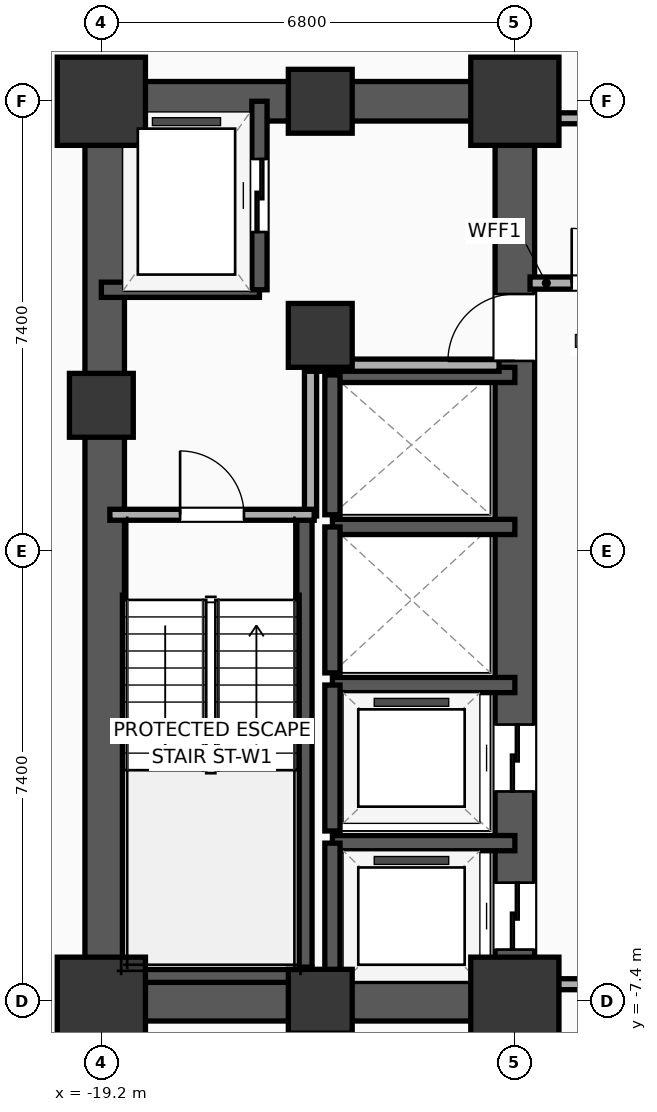
"""IFC4 building model, lengths in metres.
Left out: names, types, materials, properties, quantities, classifications, styles, units other than length and angle.
Written with IfcOpenShell. Run it as: python <this file> out.ifc"""

import sys

from ifc_helpers import new_model, si_unit, direction, frame, frame_2d, origin, origin_2d, place, context, subcontext, project, spatial, rectangle, extrude, element, fill, save


model = new_model("IFC4")
c1 = context("Model", 3, precision=1e-05, world=origin(), true_north=direction((0.0, 1.0)))
c2 = subcontext(c1, "Body", "Model", "MODEL_VIEW")
j1 = project(units=[si_unit("LENGTHUNIT", "METRE"), si_unit("PLANEANGLEUNIT", "RADIAN")], contexts=[c1])
p1 = place(None, origin())
s1 = spatial("IfcSite", under=j1, at=p1, CompositionType="ELEMENT")
p2 = place(p1, origin())
s2 = spatial("IfcBuilding", under=s1, at=p2, CompositionType="ELEMENT")
p3 = place(p2, frame((0.0, 0.0, 68.9)))
s3 = spatial("IfcBuildingStorey", under=s2, at=p3, CompositionType="ELEMENT", Elevation=68.9)
p4 = place(p3, frame((-19.2, -7.4, 0.0), z_axis=(0.0, 0.0, 1.0), x_axis=(1.0, 0.0, 0.0)))
e1 = element("IfcColumn", 1, at=p4, inside=s3, PredefinedType="COLUMN", context=c2, shape_type="SweptSolid", body=[
    extrude(rectangle(XDim=1.45, YDim=1.45, at=origin_2d()), origin(), (0.0, 0.0, 1.0), 3.9),
])
p5 = place(p3, frame((-19.2, 2.4, 0.0), z_axis=(0.0, 0.0, 1.0), x_axis=(1.0, 0.0, 0.0)))
e2 = element("IfcColumn", 2, at=p5, inside=s3, PredefinedType="COLUMN", context=c2, shape_type="SweptSolid", body=[
    extrude(rectangle(XDim=1.05, YDim=1.05, at=origin_2d()), origin(), (0.0, 0.0, 1.0), 3.9),
])
p6 = place(p3, frame((-19.2, 7.4, 0.0), z_axis=(0.0, 0.0, 1.0), x_axis=(1.0, 0.0, 0.0)))
e3 = element("IfcColumn", 3, at=p6, inside=s3, PredefinedType="COLUMN", context=c2, shape_type="SweptSolid", body=[
    extrude(rectangle(XDim=1.45, YDim=1.45, at=origin_2d()), origin(), (0.0, 0.0, 1.0), 3.9),
])
for number, where, z_axis, x_axis in (
    (4, (-15.6, -7.4, 0.0), (0.0, 0.0, 1.0), (1.0, 0.0, 0.0)),
    (5, (-15.6, 7.4, 0.0), (0.0, 0.0, 1.0), (1.0, 0.0, 0.0)),
):
    element("IfcColumn", number, at=place(p3, frame(where, z_axis=z_axis, x_axis=x_axis)), inside=s3, PredefinedType="COLUMN", context=c2, shape_type="SweptSolid", body=[
        extrude(rectangle(XDim=1.05, YDim=1.05, at=origin_2d()), origin(), (0.0, 0.0, 1.0), 3.9),
    ])
p7 = place(p3, frame((-12.4, -7.4, 0.0), z_axis=(0.0, 0.0, 1.0), x_axis=(1.0, 0.0, 0.0)))
e6 = element("IfcColumn", 6, at=p7, inside=s3, PredefinedType="COLUMN", context=c2, shape_type="SweptSolid", body=[
    extrude(rectangle(XDim=1.45, YDim=1.45, at=origin_2d()), origin(), (0.0, 0.0, 1.0), 3.9),
])
p8 = place(p3, frame((-15.6, 3.55, 0.0), z_axis=(0.0, 0.0, 1.0), x_axis=(1.0, 0.0, 0.0)))
e7 = element("IfcColumn", 7, at=p8, inside=s3, PredefinedType="COLUMN", context=c2, shape_type="SweptSolid", body=[
    extrude(rectangle(XDim=1.05, YDim=1.05, at=origin_2d()), origin(), (0.0, 0.0, 1.0), 3.9),
])
p9 = place(p3, frame((-12.4, 7.4, 0.0), z_axis=(0.0, 0.0, 1.0), x_axis=(1.0, 0.0, 0.0)))
e8 = element("IfcColumn", 8, at=p9, inside=s3, PredefinedType="COLUMN", context=c2, shape_type="SweptSolid", body=[
    extrude(rectangle(XDim=1.45, YDim=1.45, at=origin_2d()), origin(), (0.0, 0.0, 1.0), 3.9),
])
for number, where, z_axis, x_axis in (
    (9, (-19.525, -7.4, 0.0), (0.0, 0.0, 1.0), (1.0, 0.0, 0.0)),
    (10, (-19.525, 7.4, 0.0), (0.0, 0.0, 1.0), (1.0, 0.0, 0.0)),
):
    element("IfcWall", number, at=place(p3, frame(where, z_axis=z_axis, x_axis=x_axis)), inside=s3, PredefinedType="SHEAR", context=c2, shape_type="SweptSolid", body=[
        extrude(rectangle(XDim=7.45, YDim=0.65, at=frame_2d((3.725, 0.0))), origin(), (0.0, 0.0, 1.0), 3.65),
    ])
p10 = place(p3, frame((-19.145, -7.4, 0.0), z_axis=(0.0, 0.0, 1.0), x_axis=(0.0, 1.0, 0.0)))
e11 = element("IfcWall", 11, at=p10, inside=s3, PredefinedType="SHEAR", context=c2, shape_type="SweptSolid", body=[
    extrude(rectangle(XDim=14.8, YDim=0.65, at=frame_2d((7.4, 0.0))), origin(), (0.0, 0.0, 1.0), 3.65),
])
p11 = place(p3, frame((-12.4, -7.4, 0.0), z_axis=(0.0, 0.0, 1.0), x_axis=(0.0, 1.0, 0.0)))
e12 = element("IfcWall", 12, at=p11, inside=s3, PredefinedType="SHEAR", context=c2, shape_type="SweptSolid", body=[
    extrude(rectangle(XDim=14.8, YDim=0.65, at=frame_2d((7.4, 0.0))), origin(), (0.0, 0.0, 1.0), 3.65),
])
p12 = place(p11, frame((0.85, 0.0, 0.0)))
e13 = element("IfcOpeningElement", 13, at=p12, cuts=e12, PredefinedType="OPENING", context=c2, shape_type="SweptSolid", body=[
    extrude(rectangle(XDim=1.1, YDim=2.05, at=frame_2d((0.55, 1.025))), frame((0.0, 0.335, 0.0), z_axis=(0.0, -1.0, 0.0), x_axis=(1.0, 0.0, 0.0)), (0.0, 0.0, 1.0), 0.67),
])
p13 = place(p11, frame((3.45, 0.0, 0.0)))
e14 = element("IfcOpeningElement", 14, at=p13, cuts=e12, PredefinedType="OPENING", context=c2, shape_type="SweptSolid", body=[
    extrude(rectangle(XDim=1.1, YDim=2.05, at=frame_2d((0.55, 1.025))), frame((0.0, 0.335, 0.0), z_axis=(0.0, -1.0, 0.0), x_axis=(1.0, 0.0, 0.0)), (0.0, 0.0, 1.0), 0.67),
])
p14 = place(p11, frame((10.53, 0.0, 0.0)))
e15 = element("IfcOpeningElement", 15, at=p14, cuts=e12, PredefinedType="OPENING", context=c2, shape_type="SweptSolid", body=[
    extrude(rectangle(XDim=1.1, YDim=2.05, at=frame_2d((0.55, 1.025))), frame((0.0, 0.335, 0.0), z_axis=(0.0, -1.0, 0.0), x_axis=(1.0, 0.0, 0.0)), (0.0, 0.0, 1.0), 0.67),
])
p15 = place(p3, frame((-15.86, -7.085, 0.0), z_axis=(0.0, 0.0, 1.0), x_axis=(0.0, 1.0, 0.0)))
e16 = element("IfcWall", 16, at=p15, inside=s3, PredefinedType="SOLIDWALL", context=c2, shape_type="SweptSolid", body=[
    extrude(rectangle(XDim=7.685, YDim=0.25, at=frame_2d((3.843, 0.0))), origin(), (0.0, 0.0, 1.0), 3.65),
])
p16 = place(p3, frame((-19.2, -6.965, 0.0), z_axis=(0.0, 0.0, 1.0), x_axis=(1.0, 0.0, 0.0)))
e17 = element("IfcWall", 17, at=p16, inside=s3, PredefinedType="SOLIDWALL", context=c2, shape_type="SweptSolid", body=[
    extrude(rectangle(XDim=3.46, YDim=0.25, at=frame_2d((1.73, 0.0))), origin(), (0.0, 0.0, 1.0), 3.65),
])
p17 = place(p3, frame((-19.2, 4.3, 0.0), z_axis=(0.0, 0.0, 1.0), x_axis=(1.0, 0.0, 0.0)))
e18 = element("IfcWall", 18, at=p17, inside=s3, PredefinedType="SOLIDWALL", context=c2, shape_type="SweptSolid", body=[
    extrude(rectangle(XDim=2.6, YDim=0.25, at=frame_2d((1.3, 0.0))), origin(), (0.0, 0.0, 1.0), 3.65),
])
p18 = place(p3, frame((-16.6, 4.3, 0.0), z_axis=(0.0, 0.0, 1.0), x_axis=(0.0, 1.0, 0.0)))
e19 = element("IfcWall", 19, at=p18, inside=s3, PredefinedType="SOLIDWALL", context=c2, shape_type="SweptSolid", body=[
    extrude(rectangle(XDim=3.1, YDim=0.25, at=frame_2d((1.55, 0.0))), origin(), (0.0, 0.0, 1.0), 3.65),
])
p19 = place(p18, frame((0.95, 0.0, 0.0)))
e20 = element("IfcOpeningElement", 20, at=p19, cuts=e19, PredefinedType="OPENING", context=c2, shape_type="SweptSolid", body=[
    extrude(rectangle(XDim=1.2, YDim=2.05, at=frame_2d((0.6, 1.025))), frame((0.0, 0.135, 0.0), z_axis=(0.0, -1.0, 0.0), x_axis=(1.0, 0.0, 0.0)), (0.0, 0.0, 1.0), 0.27),
])
p20 = place(p3, frame((-12.4, -4.8, 0.0), z_axis=(0.0, 0.0, 1.0), x_axis=(-1.0, 0.0, 0.0)))
e21 = element("IfcWall", 21, at=p20, inside=s3, PredefinedType="SOLIDWALL", context=c2, shape_type="SweptSolid", body=[
    extrude(rectangle(XDim=3.0, YDim=0.25, at=frame_2d((1.5, 0.0))), origin(), (0.0, 0.0, 1.0), 3.65),
])
p21 = place(p3, frame((-15.4, -4.8, 0.0), z_axis=(0.0, 0.0, 1.0), x_axis=(0.0, -1.0, 0.0)))
e22 = element("IfcWall", 22, at=p21, inside=s3, PredefinedType="SOLIDWALL", context=c2, shape_type="SweptSolid", body=[
    extrude(rectangle(XDim=2.6, YDim=0.25, at=frame_2d((1.3, 0.0))), origin(), (0.0, 0.0, 1.0), 3.65),
])
p22 = place(p3, frame((-12.4, -2.2, 0.0), z_axis=(0.0, 0.0, 1.0), x_axis=(-1.0, 0.0, 0.0)))
e23 = element("IfcWall", 23, at=p22, inside=s3, PredefinedType="SOLIDWALL", context=c2, shape_type="SweptSolid", body=[
    extrude(rectangle(XDim=3.0, YDim=0.25, at=frame_2d((1.5, 0.0))), origin(), (0.0, 0.0, 1.0), 3.65),
])
p23 = place(p3, frame((-15.4, -2.2, 0.0), z_axis=(0.0, 0.0, 1.0), x_axis=(0.0, -1.0, 0.0)))
e24 = element("IfcWall", 24, at=p23, inside=s3, PredefinedType="SOLIDWALL", context=c2, shape_type="SweptSolid", body=[
    extrude(rectangle(XDim=2.4, YDim=0.25, at=frame_2d((1.2, 0.0))), origin(), (0.0, 0.0, 1.0), 3.65),
])
p24 = place(p3, frame((-12.4, 0.4, 0.0), z_axis=(0.0, 0.0, 1.0), x_axis=(-1.0, 0.0, 0.0)))
e25 = element("IfcWall", 25, at=p24, inside=s3, PredefinedType="SOLIDWALL", context=c2, shape_type="SweptSolid", body=[
    extrude(rectangle(XDim=3.0, YDim=0.25, at=frame_2d((1.5, 0.0))), origin(), (0.0, 0.0, 1.0), 3.65),
])
p25 = place(p3, frame((-15.4, 0.4, 0.0), z_axis=(0.0, 0.0, 1.0), x_axis=(0.0, -1.0, 0.0)))
e26 = element("IfcWall", 26, at=p25, inside=s3, PredefinedType="SOLIDWALL", context=c2, shape_type="SweptSolid", body=[
    extrude(rectangle(XDim=2.4, YDim=0.25, at=frame_2d((1.2, 0.0))), origin(), (0.0, 0.0, 1.0), 3.65),
])
p26 = place(p3, frame((-12.4, 2.9, 0.0), z_axis=(0.0, 0.0, 1.0), x_axis=(-1.0, 0.0, 0.0)))
e27 = element("IfcWall", 27, at=p26, inside=s3, PredefinedType="SOLIDWALL", context=c2, shape_type="SweptSolid", body=[
    extrude(rectangle(XDim=3.0, YDim=0.25, at=frame_2d((1.5, 0.0))), origin(), (0.0, 0.0, 1.0), 3.65),
])
p27 = place(p3, frame((-15.4, 2.9, 0.0), z_axis=(0.0, 0.0, 1.0), x_axis=(0.0, -1.0, 0.0)))
e28 = element("IfcWall", 28, at=p27, inside=s3, PredefinedType="SOLIDWALL", context=c2, shape_type="SweptSolid", body=[
    extrude(rectangle(XDim=2.3, YDim=0.25, at=frame_2d((1.15, 0.0))), origin(), (0.0, 0.0, 1.0), 3.65),
])
p28 = place(p3, frame((-15.76, 0.58, 0.0), z_axis=(0.0, 0.0, 1.0), x_axis=(0.0, 1.0, 0.0)))
e29 = element("IfcWall", 29, at=p28, inside=s3, PredefinedType="PARTITIONING", context=c2, shape_type="SweptSolid", body=[
    extrude(rectangle(XDim=2.52, YDim=0.2, at=frame_2d((1.26, 0.0))), origin(), (0.0, 0.0, 1.0), 3.65),
])
p29 = place(p3, frame((-15.82, 3.06, 0.0), z_axis=(0.0, 0.0, 1.0), x_axis=(1.0, 0.0, 0.0)))
e30 = element("IfcWall", 30, at=p29, inside=s3, PredefinedType="PARTITIONING", context=c2, shape_type="SweptSolid", body=[
    extrude(rectangle(XDim=3.16, YDim=0.2, at=frame_2d((1.58, 0.0))), origin(), (0.0, 0.0, 1.0), 3.65),
])
p30 = place(p3, frame((-19.06, 0.6, 0.0), z_axis=(0.0, 0.0, 1.0), x_axis=(1.0, 0.0, 0.0)))
e31 = element("IfcWall", 31, at=p30, inside=s3, PredefinedType="PARTITIONING", context=c2, shape_type="SweptSolid", body=[
    extrude(rectangle(XDim=3.36, YDim=0.18, at=frame_2d((1.68, 0.0))), origin(), (0.0, 0.0, 1.0), 3.65),
])
p31 = place(p30, frame((1.155, 0.0, 0.0)))
e32 = element("IfcOpeningElement", 32, at=p31, cuts=e31, PredefinedType="OPENING", context=c2, shape_type="SweptSolid", body=[
    extrude(rectangle(XDim=1.05, YDim=2.05, at=frame_2d((0.525, 1.025))), frame((0.0, 0.1, 0.0), z_axis=(0.0, -1.0, 0.0), x_axis=(1.0, 0.0, 0.0)), (0.0, 0.0, 1.0), 0.2),
])
p32 = place(p3, frame((-12.15, 4.41, 0.0), z_axis=(0.0, 0.0, 1.0), x_axis=(1.0, 0.0, 0.0)))
e33 = element("IfcWall", 33, at=p32, inside=s3, PredefinedType="PARTITIONING", context=c2, shape_type="SweptSolid", body=[
    extrude(rectangle(XDim=2.27, YDim=0.2, at=frame_2d((1.135, 0.0))), origin(), (0.0, 0.0, 1.0), 3.65),
])
p33 = place(p32, frame((0.685, 0.0, 0.0)))
e34 = element("IfcOpeningElement", 34, at=p33, cuts=e33, PredefinedType="OPENING", context=c2, shape_type="SweptSolid", body=[
    extrude(rectangle(XDim=0.9, YDim=2.05, at=frame_2d((0.45, 1.025))), frame((0.0, 0.11, 0.0), z_axis=(0.0, -1.0, 0.0), x_axis=(1.0, 0.0, 0.0)), (0.0, 0.0, 1.0), 0.22),
])
for number, where, z_axis, x_axis in (
    (35, (-12.15, 7.12, 0.0), (0.0, 0.0, 1.0), (1.0, 0.0, 0.0)),
    (36, (-12.15, -7.12, 0.0), (0.0, 0.0, 1.0), (1.0, 0.0, 0.0)),
):
    element("IfcWall", number, at=place(p3, frame(where, z_axis=z_axis, x_axis=x_axis)), inside=s3, PredefinedType="PARTITIONING", context=c2, shape_type="SweptSolid", body=[
        extrude(rectangle(XDim=2.27, YDim=0.18, at=frame_2d((1.135, 0.0))), origin(), (0.0, 0.0, 1.0), 2.94),
    ])
p34 = place(p19, origin())
e37 = element("IfcDoor", 37, at=p34, inside=s3, OperationType="SLIDING_TO_LEFT", PredefinedType="DOOR", context=c2, shape_type="SweptSolid", body=[
    extrude(rectangle(XDim=1.2, YDim=2.05, at=frame_2d((0.6, 1.025))), frame((0.0, 0.025, 0.0), z_axis=(0.0, -1.0, 0.0), x_axis=(1.0, 0.0, 0.0)), (0.0, 0.0, 1.0), 0.05),
])
fill(e20, e37)
p35 = place(p12, origin())
e38 = element("IfcDoor", 38, at=p35, inside=s3, OperationType="SLIDING_TO_LEFT", PredefinedType="DOOR", context=c2, shape_type="SweptSolid", body=[
    extrude(rectangle(XDim=1.1, YDim=2.05, at=frame_2d((0.55, 1.025))), frame((0.0, 0.025, 0.0), z_axis=(0.0, -1.0, 0.0), x_axis=(1.0, 0.0, 0.0)), (0.0, 0.0, 1.0), 0.05),
])
fill(e13, e38)
p36 = place(p13, origin())
e39 = element("IfcDoor", 39, at=p36, inside=s3, OperationType="SLIDING_TO_LEFT", PredefinedType="DOOR", context=c2, shape_type="SweptSolid", body=[
    extrude(rectangle(XDim=1.1, YDim=2.05, at=frame_2d((0.55, 1.025))), frame((0.0, 0.025, 0.0), z_axis=(0.0, -1.0, 0.0), x_axis=(1.0, 0.0, 0.0)), (0.0, 0.0, 1.0), 0.05),
])
fill(e14, e39)
p37 = place(p31, origin())
e40 = element("IfcDoor", 40, at=p37, inside=s3, OperationType="SINGLE_SWING_LEFT", PredefinedType="DOOR", context=c2, shape_type="SweptSolid", body=[
    extrude(rectangle(XDim=1.05, YDim=2.05, at=frame_2d((0.525, 1.025))), frame((0.0, 0.025, 0.0), z_axis=(0.0, -1.0, 0.0), x_axis=(1.0, 0.0, 0.0)), (0.0, 0.0, 1.0), 0.05),
])
fill(e32, e40)
p38 = place(p33, origin())
e41 = element("IfcDoor", 41, at=p38, inside=s3, OperationType="SINGLE_SWING_LEFT", PredefinedType="DOOR", context=c2, shape_type="SweptSolid", body=[
    extrude(rectangle(XDim=0.9, YDim=2.05, at=frame_2d((0.45, 1.025))), frame((0.0, 0.025, 0.0), z_axis=(0.0, -1.0, 0.0), x_axis=(1.0, 0.0, 0.0)), (0.0, 0.0, 1.0), 0.05),
])
fill(e34, e41)
p39 = place(p14, origin())
e42 = element("IfcDoor", 42, at=p39, inside=s3, OperationType="SINGLE_SWING_LEFT", PredefinedType="DOOR", context=c2, shape_type="SweptSolid", body=[
    extrude(rectangle(XDim=1.1, YDim=2.05, at=frame_2d((0.55, 1.025))), frame((0.0, 0.025, 0.0), z_axis=(0.0, -1.0, 0.0), x_axis=(1.0, 0.0, 0.0)), (0.0, 0.0, 1.0), 0.05),
])
fill(e15, e42)
save(model, sys.argv[1])
